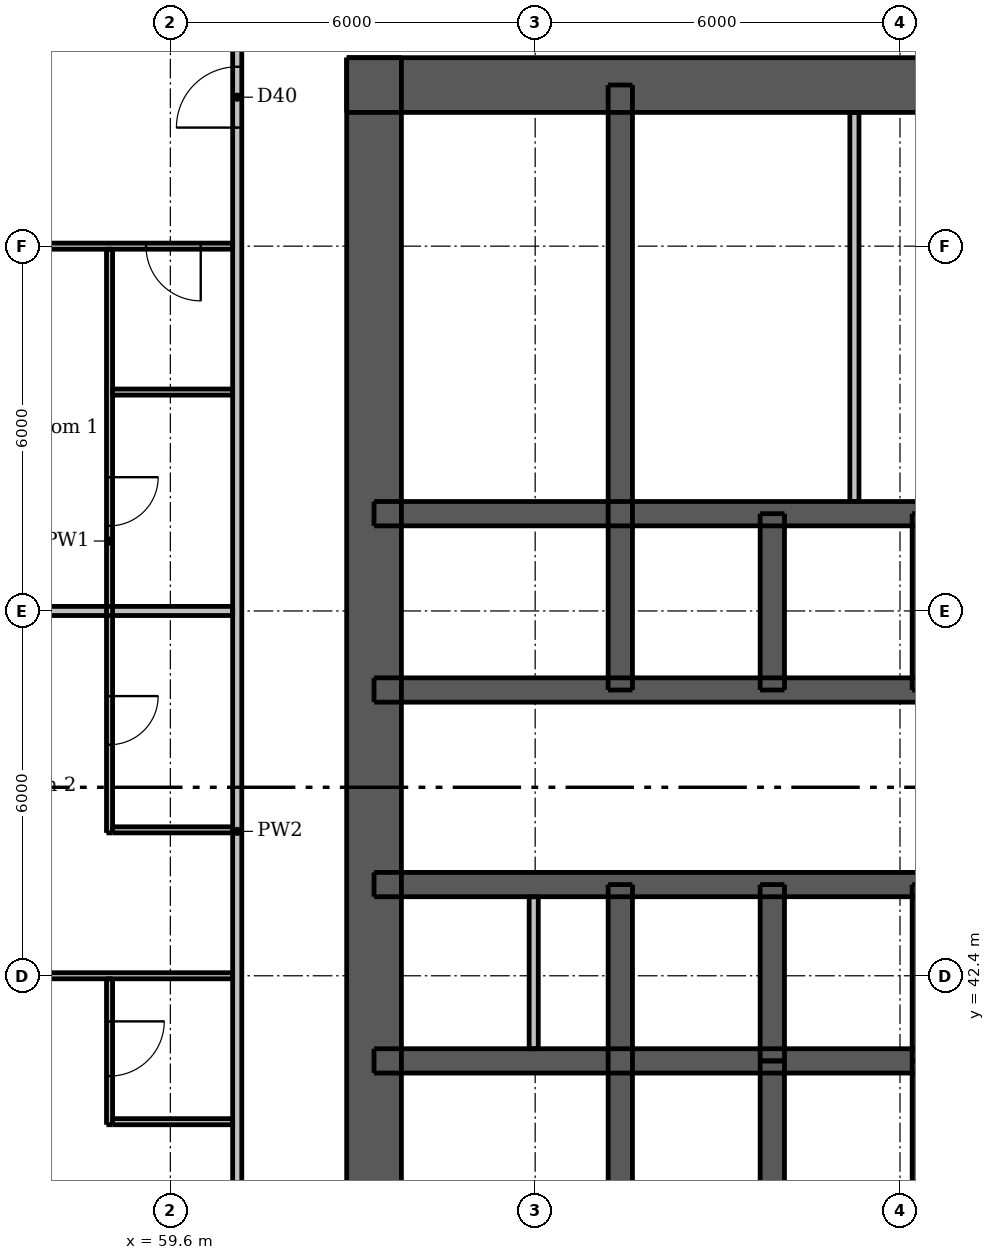
"""IFC4 building model, lengths in metres.
Left out: names, types, materials, properties, quantities, classifications, styles, units other than length and angle.
Written with IfcOpenShell. Run it as: python <this file> out.ifc"""

import sys

from ifc_helpers import new_model, si_unit, direction, frame, frame_2d, origin, place, context, subcontext, project, spatial, rectangle, extrude, element, fill, save


model = new_model("IFC4")
c1 = context("Model", 3, precision=1e-05, world=origin(), true_north=direction((0.0, 1.0)))
c2 = subcontext(c1, "Body", "Model", "MODEL_VIEW")
j1 = project(units=[si_unit("LENGTHUNIT", "METRE"), si_unit("PLANEANGLEUNIT", "RADIAN")], contexts=[c1])
p1 = place(None, origin())
s1 = spatial("IfcSite", under=j1, at=p1, CompositionType="ELEMENT")
p2 = place(p1, origin())
s2 = spatial("IfcBuilding", under=s1, at=p2, CompositionType="ELEMENT")
p3 = place(p2, frame((0.0, 0.0, 49.9)))
s3 = spatial("IfcBuildingStorey", under=s2, at=p3, CompositionType="ELEMENT", Elevation=49.9)
p4 = place(p3, frame((62.5, 57.05, 0.0), z_axis=(0.0, 0.0, 1.0), x_axis=(1.0, 0.0, 0.0)))
e1 = element("IfcWall", 1, at=p4, inside=s3, PredefinedType="SHEAR", context=c2, shape_type="SweptSolid", body=[
    extrude(rectangle(XDim=24.0, YDim=0.9, at=frame_2d((12.0, 0.0))), origin(), (0.0, 0.0, 1.0), 3.05),
])
p5 = place(p4, frame((20.85, 0.0, 0.0)))
e2 = element("IfcOpeningElement", 2, at=p5, cuts=e1, PredefinedType="OPENING", context=c2, shape_type="SweptSolid", body=[
    extrude(rectangle(XDim=1.1, YDim=2.1, at=frame_2d((0.55, 1.05))), frame((0.0, 0.46, 0.0), z_axis=(0.0, -1.0, 0.0), x_axis=(1.0, 0.0, 0.0)), (0.0, 0.0, 1.0), 0.92),
])
p6 = place(p4, frame((2.05, 0.0, 0.0)))
e3 = element("IfcOpeningElement", 3, at=p6, cuts=e1, PredefinedType="OPENING", context=c2, shape_type="SweptSolid", body=[
    extrude(rectangle(XDim=1.1, YDim=2.1, at=frame_2d((0.55, 1.05))), frame((0.0, 0.46, 0.0), z_axis=(0.0, -1.0, 0.0), x_axis=(1.0, 0.0, 0.0)), (0.0, 0.0, 1.0), 0.92),
])
p7 = place(p4, frame((6.075, 0.0, 0.0)))
e4 = element("IfcOpeningElement", 4, at=p7, cuts=e1, PredefinedType="OPENING", context=c2, shape_type="SweptSolid", body=[
    extrude(rectangle(XDim=0.9, YDim=2.1, at=frame_2d((0.45, 1.05))), frame((0.0, 0.46, 0.0), z_axis=(0.0, -1.0, 0.0), x_axis=(1.0, 0.0, 0.0)), (0.0, 0.0, 1.0), 0.92),
])
p8 = place(p4, frame((10.455, 0.0, 0.0)))
e5 = element("IfcOpeningElement", 5, at=p8, cuts=e1, PredefinedType="OPENING", context=c2, shape_type="SweptSolid", body=[
    extrude(rectangle(XDim=0.9, YDim=2.1, at=frame_2d((0.45, 1.05))), frame((0.0, 0.46, 0.0), z_axis=(0.0, -1.0, 0.0), x_axis=(1.0, 0.0, 0.0)), (0.0, 0.0, 1.0), 0.92),
])
p9 = place(p4, frame((15.93, 0.0, 0.0)))
e6 = element("IfcOpeningElement", 6, at=p9, cuts=e1, PredefinedType="OPENING", context=c2, shape_type="SweptSolid", body=[
    extrude(rectangle(XDim=0.9, YDim=2.1, at=frame_2d((0.45, 1.05))), frame((0.0, 0.46, 0.0), z_axis=(0.0, -1.0, 0.0), x_axis=(1.0, 0.0, 0.0)), (0.0, 0.0, 1.0), 0.92),
])
p10 = place(p3, frame((62.95, 33.5, 0.0), z_axis=(0.0, 0.0, 1.0), x_axis=(0.0, 1.0, 0.0)))
e7 = element("IfcWall", 7, at=p10, inside=s3, PredefinedType="SHEAR", context=c2, shape_type="SweptSolid", body=[
    extrude(rectangle(XDim=24.0, YDim=0.9, at=frame_2d((12.0, 0.0))), origin(), (0.0, 0.0, 1.0), 3.05),
])
p11 = place(p10, frame((11.2, 0.0, 0.0)))
e8 = element("IfcOpeningElement", 8, at=p11, cuts=e7, PredefinedType="OPENING", context=c2, shape_type="SweptSolid", body=[
    extrude(rectangle(XDim=1.6, YDim=2.1, at=frame_2d((0.8, 1.05))), frame((0.0, 0.46, 0.0), z_axis=(0.0, -1.0, 0.0), x_axis=(1.0, 0.0, 0.0)), (0.0, 0.0, 1.0), 0.92),
])
p12 = place(p3, frame((62.95, 41.0, 0.0), z_axis=(0.0, 0.0, 1.0), x_axis=(1.0, 0.0, 0.0)))
e9 = element("IfcWall", 9, at=p12, inside=s3, PredefinedType="SHEAR", context=c2, shape_type="SweptSolid", body=[
    extrude(rectangle(XDim=23.1, YDim=0.4, at=frame_2d((11.55, 0.0))), origin(), (0.0, 0.0, 1.0), 3.05),
])
p13 = place(p3, frame((62.95, 43.9, 0.0), z_axis=(0.0, 0.0, 1.0), x_axis=(1.0, 0.0, 0.0)))
e10 = element("IfcWall", 10, at=p13, inside=s3, PredefinedType="SHEAR", context=c2, shape_type="SweptSolid", body=[
    extrude(rectangle(XDim=23.1, YDim=0.4, at=frame_2d((11.55, 0.0))), origin(), (0.0, 0.0, 1.0), 3.05),
])
p14 = place(p13, frame((1.088, 0.0, 0.0)))
e11 = element("IfcOpeningElement", 11, at=p14, cuts=e10, PredefinedType="OPENING", context=c2, shape_type="SweptSolid", body=[
    extrude(rectangle(XDim=0.9, YDim=2.1, at=frame_2d((0.45, 1.05))), frame((0.0, 0.21, 0.0), z_axis=(0.0, -1.0, 0.0), x_axis=(1.0, 0.0, 0.0)), (0.0, 0.0, 1.0), 0.42),
])
p15 = place(p13, frame((2.838, 0.0, 0.0)))
e12 = element("IfcOpeningElement", 12, at=p15, cuts=e10, PredefinedType="OPENING", context=c2, shape_type="SweptSolid", body=[
    extrude(rectangle(XDim=0.8, YDim=2.1, at=frame_2d((0.4, 1.05))), frame((0.0, 0.21, 0.0), z_axis=(0.0, -1.0, 0.0), x_axis=(1.0, 0.0, 0.0)), (0.0, 0.0, 1.0), 0.42),
])
p16 = place(p13, frame((20.5, 0.0, 0.0)))
e13 = element("IfcOpeningElement", 13, at=p16, cuts=e10, PredefinedType="OPENING", context=c2, shape_type="SweptSolid", body=[
    extrude(rectangle(XDim=0.9, YDim=2.1, at=frame_2d((0.45, 1.05))), frame((0.0, 0.21, 0.0), z_axis=(0.0, -1.0, 0.0), x_axis=(1.0, 0.0, 0.0)), (0.0, 0.0, 1.0), 0.42),
])
p17 = place(p13, frame((4.75, 0.0, 0.0)))
e14 = element("IfcOpeningElement", 14, at=p17, cuts=e10, PredefinedType="OPENING", context=c2, shape_type="SweptSolid", body=[
    extrude(rectangle(XDim=1.1, YDim=2.1, at=frame_2d((0.55, 1.05))), frame((0.0, 0.21, 0.0), z_axis=(0.0, -1.0, 0.0), x_axis=(1.0, 0.0, 0.0)), (0.0, 0.0, 1.0), 0.42),
])
p18 = place(p13, frame((7.25, 0.0, 0.0)))
e15 = element("IfcOpeningElement", 15, at=p18, cuts=e10, PredefinedType="OPENING", context=c2, shape_type="SweptSolid", body=[
    extrude(rectangle(XDim=1.1, YDim=2.1, at=frame_2d((0.55, 1.05))), frame((0.0, 0.21, 0.0), z_axis=(0.0, -1.0, 0.0), x_axis=(1.0, 0.0, 0.0)), (0.0, 0.0, 1.0), 0.42),
])
p19 = place(p13, frame((9.75, 0.0, 0.0)))
e16 = element("IfcOpeningElement", 16, at=p19, cuts=e10, PredefinedType="OPENING", context=c2, shape_type="SweptSolid", body=[
    extrude(rectangle(XDim=1.1, YDim=2.1, at=frame_2d((0.55, 1.05))), frame((0.0, 0.21, 0.0), z_axis=(0.0, -1.0, 0.0), x_axis=(1.0, 0.0, 0.0)), (0.0, 0.0, 1.0), 0.42),
])
p20 = place(p13, frame((12.25, 0.0, 0.0)))
e17 = element("IfcOpeningElement", 17, at=p20, cuts=e10, PredefinedType="OPENING", context=c2, shape_type="SweptSolid", body=[
    extrude(rectangle(XDim=1.1, YDim=2.1, at=frame_2d((0.55, 1.05))), frame((0.0, 0.21, 0.0), z_axis=(0.0, -1.0, 0.0), x_axis=(1.0, 0.0, 0.0)), (0.0, 0.0, 1.0), 0.42),
])
p21 = place(p13, frame((14.75, 0.0, 0.0)))
e18 = element("IfcOpeningElement", 18, at=p21, cuts=e10, PredefinedType="OPENING", context=c2, shape_type="SweptSolid", body=[
    extrude(rectangle(XDim=1.1, YDim=2.1, at=frame_2d((0.55, 1.05))), frame((0.0, 0.21, 0.0), z_axis=(0.0, -1.0, 0.0), x_axis=(1.0, 0.0, 0.0)), (0.0, 0.0, 1.0), 0.42),
])
p22 = place(p13, frame((17.25, 0.0, 0.0)))
e19 = element("IfcOpeningElement", 19, at=p22, cuts=e10, PredefinedType="OPENING", context=c2, shape_type="SweptSolid", body=[
    extrude(rectangle(XDim=1.1, YDim=2.1, at=frame_2d((0.55, 1.05))), frame((0.0, 0.21, 0.0), z_axis=(0.0, -1.0, 0.0), x_axis=(1.0, 0.0, 0.0)), (0.0, 0.0, 1.0), 0.42),
])
p23 = place(p3, frame((62.95, 47.1, 0.0), z_axis=(0.0, 0.0, 1.0), x_axis=(1.0, 0.0, 0.0)))
e20 = element("IfcWall", 20, at=p23, inside=s3, PredefinedType="SHEAR", context=c2, shape_type="SweptSolid", body=[
    extrude(rectangle(XDim=23.1, YDim=0.4, at=frame_2d((11.55, 0.0))), origin(), (0.0, 0.0, 1.0), 3.05),
])
p24 = place(p23, frame((1.7, 0.0, 0.0)))
e21 = element("IfcOpeningElement", 21, at=p24, cuts=e20, PredefinedType="OPENING", context=c2, shape_type="SweptSolid", body=[
    extrude(rectangle(XDim=0.9, YDim=2.1, at=frame_2d((0.45, 1.05))), frame((0.0, 0.21, 0.0), z_axis=(0.0, -1.0, 0.0), x_axis=(1.0, 0.0, 0.0)), (0.0, 0.0, 1.0), 0.42),
])
p25 = place(p23, frame((20.5, 0.0, 0.0)))
e22 = element("IfcOpeningElement", 22, at=p25, cuts=e20, PredefinedType="OPENING", context=c2, shape_type="SweptSolid", body=[
    extrude(rectangle(XDim=0.9, YDim=2.1, at=frame_2d((0.45, 1.05))), frame((0.0, 0.21, 0.0), z_axis=(0.0, -1.0, 0.0), x_axis=(1.0, 0.0, 0.0)), (0.0, 0.0, 1.0), 0.42),
])
p26 = place(p3, frame((62.95, 50.0, 0.0), z_axis=(0.0, 0.0, 1.0), x_axis=(1.0, 0.0, 0.0)))
e23 = element("IfcWall", 23, at=p26, inside=s3, PredefinedType="SHEAR", context=c2, shape_type="SweptSolid", body=[
    extrude(rectangle(XDim=23.1, YDim=0.4, at=frame_2d((11.55, 0.0))), origin(), (0.0, 0.0, 1.0), 3.05),
])
p27 = place(p3, frame((67.0, 33.95, 0.0), z_axis=(0.0, 0.0, 1.0), x_axis=(0.0, 1.0, 0.0)))
e24 = element("IfcWall", 24, at=p27, inside=s3, PredefinedType="SHEAR", context=c2, shape_type="SweptSolid", body=[
    extrude(rectangle(XDim=9.95, YDim=0.4, at=frame_2d((4.975, 0.0))), origin(), (0.0, 0.0, 1.0), 3.05),
])
p28 = place(p27, frame((0.65, 0.0, 0.0)))
e25 = element("IfcOpeningElement", 25, at=p28, cuts=e24, PredefinedType="OPENING", context=c2, shape_type="SweptSolid", body=[
    extrude(rectangle(XDim=1.1, YDim=2.1, at=frame_2d((0.55, 1.05))), frame((0.0, 0.21, 0.0), z_axis=(0.0, -1.0, 0.0), x_axis=(1.0, 0.0, 0.0)), (0.0, 0.0, 1.0), 0.42),
])
p29 = place(p3, frame((67.0, 47.1, 0.0), z_axis=(0.0, 0.0, 1.0), x_axis=(0.0, 1.0, 0.0)))
e26 = element("IfcWall", 26, at=p29, inside=s3, PredefinedType="SHEAR", context=c2, shape_type="SweptSolid", body=[
    extrude(rectangle(XDim=9.95, YDim=0.4, at=frame_2d((4.975, 0.0))), origin(), (0.0, 0.0, 1.0), 3.05),
])
for number, where, z_axis, x_axis in (
    (27, (69.5, 41.0, 0.0), (0.0, 0.0, 1.0), (0.0, 1.0, 0.0)),
    (28, (69.5, 47.1, 0.0), (0.0, 0.0, 1.0), (0.0, 1.0, 0.0)),
    (29, (72.0, 41.0, 0.0), (0.0, 0.0, 1.0), (0.0, 1.0, 0.0)),
    (30, (72.0, 47.1, 0.0), (0.0, 0.0, 1.0), (0.0, 1.0, 0.0)),
    (31, (69.5, 38.1, 0.0), (0.0, 0.0, 1.0), (0.0, 1.0, 0.0)),
    (32, (72.0, 38.1, 0.0), (0.0, 0.0, 1.0), (0.0, 1.0, 0.0)),
):
    element("IfcWall", number, at=place(p3, frame(where, z_axis=z_axis, x_axis=x_axis)), inside=s3, PredefinedType="SHEAR", context=c2, shape_type="SweptSolid", body=[
        extrude(rectangle(XDim=2.9, YDim=0.4, at=frame_2d((1.45, 0.0))), origin(), (0.0, 0.0, 1.0), 3.05),
    ])
p30 = place(p3, frame((65.576, 41.2, 0.0), z_axis=(0.0, 0.0, 1.0), x_axis=(0.0, 1.0, 0.0)))
e33 = element("IfcWall", 33, at=p30, inside=s3, PredefinedType="PLUMBINGWALL", context=c2, shape_type="SweptSolid", body=[
    extrude(rectangle(XDim=2.5, YDim=0.15, at=frame_2d((1.25, 0.0))), origin(), (0.0, 0.0, 1.0), 3.05),
])
p31 = place(p3, frame((70.85, 50.2, 0.0), z_axis=(0.0, 0.0, 1.0), x_axis=(0.0, 1.0, 0.0)))
e34 = element("IfcWall", 34, at=p31, inside=s3, PredefinedType="PLUMBINGWALL", context=c2, shape_type="SweptSolid", body=[
    extrude(rectangle(XDim=6.4, YDim=0.15, at=frame_2d((3.2, 0.0))), origin(), (0.0, 0.0, 1.0), 3.05),
])
p32 = place(p3, frame((58.6, 42.35, 0.0), z_axis=(0.0, 0.0, 1.0), x_axis=(0.0, -1.0, 0.0)))
e35 = element("IfcWall", 35, at=p32, inside=s3, PredefinedType="PARTITIONING", context=c2, shape_type="SweptSolid", body=[
    extrude(rectangle(XDim=2.4, YDim=0.1, at=frame_2d((1.2, 0.0))), origin(), (0.0, 0.0, 1.0), 3.05),
])
p33 = place(p32, frame((0.7, 0.0, 0.0)))
e36 = element("IfcOpeningElement", 36, at=p33, cuts=e35, PredefinedType="OPENING", context=c2, shape_type="SweptSolid", body=[
    extrude(rectangle(XDim=0.9, YDim=2.1, at=frame_2d((0.45, 1.05))), frame((0.0, 0.06, 0.0), z_axis=(0.0, -1.0, 0.0), x_axis=(1.0, 0.0, 0.0)), (0.0, 0.0, 1.0), 0.12),
])
p34 = place(p3, frame((58.6, 54.35, 0.0), z_axis=(0.0, 0.0, 1.0), x_axis=(0.0, -1.0, 0.0)))
e37 = element("IfcWall", 37, at=p34, inside=s3, PredefinedType="PARTITIONING", context=c2, shape_type="SweptSolid", body=[
    extrude(rectangle(XDim=9.6, YDim=0.1, at=frame_2d((4.8, 0.0))), origin(), (0.0, 0.0, 1.0), 3.05),
])
p35 = place(p34, frame((7.35, 0.0, 0.0)))
e38 = element("IfcOpeningElement", 38, at=p35, cuts=e37, PredefinedType="OPENING", context=c2, shape_type="SweptSolid", body=[
    extrude(rectangle(XDim=0.8, YDim=2.1, at=frame_2d((0.4, 1.05))), frame((0.0, 0.06, 0.0), z_axis=(0.0, -1.0, 0.0), x_axis=(1.0, 0.0, 0.0)), (0.0, 0.0, 1.0), 0.12),
])
p36 = place(p34, frame((3.75, 0.0, 0.0)))
e39 = element("IfcOpeningElement", 39, at=p36, cuts=e37, PredefinedType="OPENING", context=c2, shape_type="SweptSolid", body=[
    extrude(rectangle(XDim=0.8, YDim=2.1, at=frame_2d((0.4, 1.05))), frame((0.0, 0.06, 0.0), z_axis=(0.0, -1.0, 0.0), x_axis=(1.0, 0.0, 0.0)), (0.0, 0.0, 1.0), 0.12),
])
p37 = place(p3, frame((60.625, 54.4, 0.0), z_axis=(0.0, 0.0, 1.0), x_axis=(-1.0, 0.0, 0.0)))
e40 = element("IfcWall", 40, at=p37, inside=s3, PredefinedType="PARTITIONING", context=c2, shape_type="SweptSolid", body=[
    extrude(rectangle(XDim=8.625, YDim=0.1, at=frame_2d((4.312, 0.0))), origin(), (0.0, 0.0, 1.0), 2.516),
])
p38 = place(p37, frame((0.525, 0.0, 0.0)))
e41 = element("IfcOpeningElement", 41, at=p38, cuts=e40, PredefinedType="OPENING", context=c2, shape_type="SweptSolid", body=[
    extrude(rectangle(XDim=0.9, YDim=2.1, at=frame_2d((0.45, 1.05))), frame((0.0, 0.06, 0.0), z_axis=(0.0, -1.0, 0.0), x_axis=(1.0, 0.0, 0.0)), (0.0, 0.0, 1.0), 0.12),
])
p39 = place(p37, frame((4.875, 0.0, 0.0)))
e42 = element("IfcOpeningElement", 42, at=p39, cuts=e40, PredefinedType="OPENING", context=c2, shape_type="SweptSolid", body=[
    extrude(rectangle(XDim=0.9, YDim=2.1, at=frame_2d((0.45, 1.05))), frame((0.0, 0.06, 0.0), z_axis=(0.0, -1.0, 0.0), x_axis=(1.0, 0.0, 0.0)), (0.0, 0.0, 1.0), 0.12),
])
for number, where, z_axis, x_axis in (
    (43, (58.65, 52.0, 0.0), (0.0, 0.0, 1.0), (1.0, 0.0, 0.0)),
    (44, (58.65, 44.8, 0.0), (0.0, 0.0, 1.0), (1.0, 0.0, 0.0)),
):
    element("IfcWall", number, at=place(p3, frame(where, z_axis=z_axis, x_axis=x_axis)), inside=s3, PredefinedType="PARTITIONING", context=c2, shape_type="SweptSolid", body=[
        extrude(rectangle(XDim=1.975, YDim=0.1, at=frame_2d((0.988, 0.0))), origin(), (0.0, 0.0, 1.0), 3.05),
    ])
p40 = place(p3, frame((52.0, 42.4, 0.0), z_axis=(0.0, 0.0, 1.0), x_axis=(1.0, 0.0, 0.0)))
e45 = element("IfcWall", 45, at=p40, inside=s3, PredefinedType="PARTITIONING", context=c2, shape_type="SweptSolid", body=[
    extrude(rectangle(XDim=8.625, YDim=0.1, at=frame_2d((4.312, 0.0))), origin(), (0.0, 0.0, 1.0), 2.516),
])
p41 = place(p40, frame((2.85, 0.0, 0.0)))
e46 = element("IfcOpeningElement", 46, at=p41, cuts=e45, PredefinedType="OPENING", context=c2, shape_type="SweptSolid", body=[
    extrude(rectangle(XDim=0.9, YDim=2.1, at=frame_2d((0.45, 1.05))), frame((0.0, 0.06, 0.0), z_axis=(0.0, -1.0, 0.0), x_axis=(1.0, 0.0, 0.0)), (0.0, 0.0, 1.0), 0.12),
])
p42 = place(p3, frame((58.65, 40.0, 0.0), z_axis=(0.0, 0.0, 1.0), x_axis=(1.0, 0.0, 0.0)))
e47 = element("IfcWall", 47, at=p42, inside=s3, PredefinedType="PARTITIONING", context=c2, shape_type="SweptSolid", body=[
    extrude(rectangle(XDim=1.975, YDim=0.1, at=frame_2d((0.988, 0.0))), origin(), (0.0, 0.0, 1.0), 3.05),
])
p43 = place(p3, frame((60.7, 30.325, 0.0), z_axis=(0.0, 0.0, 1.0), x_axis=(0.0, 1.0, 0.0)))
e48 = element("IfcWall", 48, at=p43, inside=s3, PredefinedType="PARTITIONING", context=c2, shape_type="SweptSolid", body=[
    extrude(rectangle(XDim=28.9, YDim=0.15, at=frame_2d((14.45, 0.0))), origin(), (0.0, 0.0, 1.0), 3.05),
])
p44 = place(p43, frame((7.375, 0.0, 0.0)))
e49 = element("IfcOpeningElement", 49, at=p44, cuts=e48, PredefinedType="OPENING", context=c2, shape_type="SweptSolid", body=[
    extrude(rectangle(XDim=1.0, YDim=2.1, at=frame_2d((0.5, 1.05))), frame((0.0, 0.085, 0.0), z_axis=(0.0, -1.0, 0.0), x_axis=(1.0, 0.0, 0.0)), (0.0, 0.0, 1.0), 0.17),
])
p45 = place(p43, frame((26.025, 0.0, 0.0)))
e50 = element("IfcOpeningElement", 50, at=p45, cuts=e48, PredefinedType="OPENING", context=c2, shape_type="SweptSolid", body=[
    extrude(rectangle(XDim=1.0, YDim=2.1, at=frame_2d((0.5, 1.05))), frame((0.0, 0.085, 0.0), z_axis=(0.0, -1.0, 0.0), x_axis=(1.0, 0.0, 0.0)), (0.0, 0.0, 1.0), 0.17),
])
p46 = place(p3, frame((52.0, 48.4, 0.0), z_axis=(0.0, 0.0, 1.0), x_axis=(1.0, 0.0, 0.0)))
e51 = element("IfcWall", 51, at=p46, inside=s3, PredefinedType="PARTITIONING", context=c2, shape_type="SweptSolid", body=[
    extrude(rectangle(XDim=8.625, YDim=0.15, at=frame_2d((4.312, 0.0))), origin(), (0.0, 0.0, 1.0), 2.516),
])
p47 = place(p6, origin())
e52 = element("IfcDoor", 52, at=p47, inside=s3, OperationType="SINGLE_SWING_LEFT", PredefinedType="DOOR", context=c2, shape_type="SweptSolid", body=[
    extrude(rectangle(XDim=1.1, YDim=2.1, at=frame_2d((0.55, 1.05))), frame((0.0, -0.388, 0.0), z_axis=(0.0, -1.0, 0.0), x_axis=(1.0, 0.0, 0.0)), (0.0, 0.0, 1.0), 0.05),
])
fill(e3, e52)
p48 = place(p11, origin())
e53 = element("IfcDoor", 53, at=p48, inside=s3, OperationType="DOUBLE_DOOR_SINGLE_SWING", PredefinedType="DOOR", context=c2, shape_type="SweptSolid", body=[
    extrude(rectangle(XDim=1.6, YDim=2.1, at=frame_2d((0.8, 1.05))), frame((0.0, -0.388, 0.0), z_axis=(0.0, -1.0, 0.0), x_axis=(1.0, 0.0, 0.0)), (0.0, 0.0, 1.0), 0.05),
])
fill(e8, e53)
p49 = place(p14, origin())
e54 = element("IfcDoor", 54, at=p49, inside=s3, OperationType="SINGLE_SWING_LEFT", PredefinedType="DOOR", context=c2, shape_type="SweptSolid", body=[
    extrude(rectangle(XDim=0.9, YDim=2.1, at=frame_2d((0.45, 1.05))), frame((0.0, -0.138, 0.0), z_axis=(0.0, -1.0, 0.0), x_axis=(1.0, 0.0, 0.0)), (0.0, 0.0, 1.0), 0.05),
])
fill(e11, e54)
p50 = place(p15, origin())
e55 = element("IfcDoor", 55, at=p50, inside=s3, OperationType="SINGLE_SWING_RIGHT", PredefinedType="DOOR", context=c2, shape_type="SweptSolid", body=[
    extrude(rectangle(XDim=0.8, YDim=2.1, at=frame_2d((0.4, 1.05))), frame((0.0, -0.138, 0.0), z_axis=(0.0, -1.0, 0.0), x_axis=(1.0, 0.0, 0.0)), (0.0, 0.0, 1.0), 0.05),
])
fill(e12, e55)
p51 = place(p24, origin())
e56 = element("IfcDoor", 56, at=p51, inside=s3, OperationType="SINGLE_SWING_LEFT", PredefinedType="DOOR", context=c2, shape_type="SweptSolid", body=[
    extrude(rectangle(XDim=0.9, YDim=2.1, at=frame_2d((0.45, 1.05))), frame((0.0, 0.188, 0.0), z_axis=(0.0, -1.0, 0.0), x_axis=(1.0, 0.0, 0.0)), (0.0, 0.0, 1.0), 0.05),
])
fill(e21, e56)
p52 = place(p7, origin())
e57 = element("IfcDoor", 57, at=p52, inside=s3, OperationType="SINGLE_SWING_RIGHT", PredefinedType="DOOR", context=c2, shape_type="SweptSolid", body=[
    extrude(rectangle(XDim=0.9, YDim=2.1, at=frame_2d((0.45, 1.05))), frame((0.0, -0.388, 0.0), z_axis=(0.0, -1.0, 0.0), x_axis=(1.0, 0.0, 0.0)), (0.0, 0.0, 1.0), 0.05),
])
fill(e4, e57)
p53 = place(p17, origin())
e58 = element("IfcDoor", 58, at=p53, inside=s3, OperationType="DOUBLE_DOOR_SLIDING", PredefinedType="DOOR", context=c2, shape_type="SweptSolid", body=[
    extrude(rectangle(XDim=1.1, YDim=2.1, at=frame_2d((0.55, 1.05))), frame((0.0, 0.025, 0.0), z_axis=(0.0, -1.0, 0.0), x_axis=(1.0, 0.0, 0.0)), (0.0, 0.0, 1.0), 0.05),
])
fill(e14, e58)
p54 = place(p18, origin())
e59 = element("IfcDoor", 59, at=p54, inside=s3, OperationType="DOUBLE_DOOR_SLIDING", PredefinedType="DOOR", context=c2, shape_type="SweptSolid", body=[
    extrude(rectangle(XDim=1.1, YDim=2.1, at=frame_2d((0.55, 1.05))), frame((0.0, 0.025, 0.0), z_axis=(0.0, -1.0, 0.0), x_axis=(1.0, 0.0, 0.0)), (0.0, 0.0, 1.0), 0.05),
])
fill(e15, e59)
p55 = place(p33, origin())
e60 = element("IfcDoor", 60, at=p55, inside=s3, OperationType="SINGLE_SWING_LEFT", PredefinedType="DOOR", context=c2, shape_type="SweptSolid", body=[
    extrude(rectangle(XDim=0.9, YDim=2.1, at=frame_2d((0.45, 1.05))), frame((0.0, 0.025, 0.0), z_axis=(0.0, -1.0, 0.0), x_axis=(1.0, 0.0, 0.0)), (0.0, 0.0, 1.0), 0.05),
])
fill(e36, e60)
p56 = place(p35, origin())
e61 = element("IfcDoor", 61, at=p56, inside=s3, OperationType="SINGLE_SWING_LEFT", PredefinedType="DOOR", context=c2, shape_type="SweptSolid", body=[
    extrude(rectangle(XDim=0.8, YDim=2.1, at=frame_2d((0.4, 1.05))), frame((0.0, 0.025, 0.0), z_axis=(0.0, -1.0, 0.0), x_axis=(1.0, 0.0, 0.0)), (0.0, 0.0, 1.0), 0.05),
])
fill(e38, e61)
p57 = place(p45, origin())
e62 = element("IfcDoor", 62, at=p57, inside=s3, OperationType="SINGLE_SWING_LEFT", PredefinedType="DOOR", context=c2, shape_type="SweptSolid", body=[
    extrude(rectangle(XDim=1.0, YDim=2.1, at=frame_2d((0.5, 1.05))), frame((0.0, 0.025, 0.0), z_axis=(0.0, -1.0, 0.0), x_axis=(1.0, 0.0, 0.0)), (0.0, 0.0, 1.0), 0.05),
])
fill(e50, e62)
p58 = place(p38, origin())
e63 = element("IfcDoor", 63, at=p58, inside=s3, OperationType="SINGLE_SWING_LEFT", PredefinedType="DOOR", context=c2, shape_type="SweptSolid", body=[
    extrude(rectangle(XDim=0.9, YDim=2.1, at=frame_2d((0.45, 1.05))), frame((0.0, 0.025, 0.0), z_axis=(0.0, -1.0, 0.0), x_axis=(1.0, 0.0, 0.0)), (0.0, 0.0, 1.0), 0.05),
])
fill(e41, e63)
p59 = place(p36, origin())
e64 = element("IfcDoor", 64, at=p59, inside=s3, OperationType="SINGLE_SWING_LEFT", PredefinedType="DOOR", context=c2, shape_type="SweptSolid", body=[
    extrude(rectangle(XDim=0.8, YDim=2.1, at=frame_2d((0.4, 1.05))), frame((0.0, 0.025, 0.0), z_axis=(0.0, -1.0, 0.0), x_axis=(1.0, 0.0, 0.0)), (0.0, 0.0, 1.0), 0.05),
])
fill(e39, e64)
save(model, sys.argv[1])
